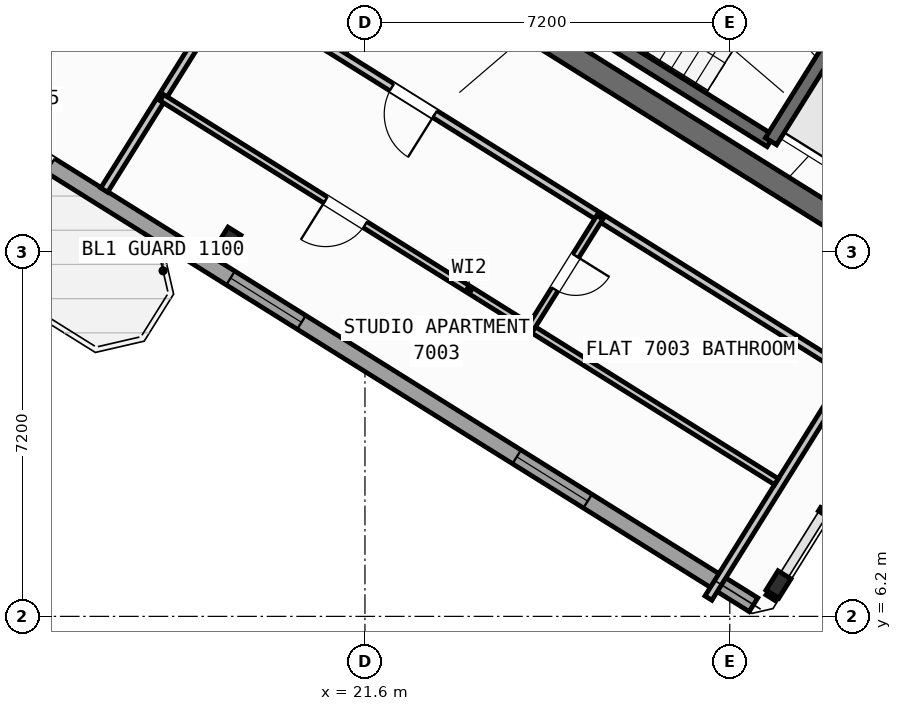
"""IFC4 building model, lengths in metres.
Left out: names, types, materials, properties, quantities, classifications, styles, units other than length and angle.
Written with IfcOpenShell. Run it as: python <this file> out.ifc"""

import sys

from ifc_helpers import new_model, si_unit, direction, frame, frame_2d, origin, origin_2d, place, context, subcontext, project, spatial, rectangle, i_section, extrude, source, transform, mapped, element, fill, save


model = new_model("IFC4")
c1 = context("Model", 3, precision=1e-05, world=origin(), true_north=direction((0.0, 1.0)))
c2 = subcontext(c1, "Body", "Model", "MODEL_VIEW")
j1 = project(units=[si_unit("LENGTHUNIT", "METRE"), si_unit("PLANEANGLEUNIT", "RADIAN")], contexts=[c1])
p1 = place(None, origin())
s1 = spatial("IfcSite", under=j1, at=p1, CompositionType="ELEMENT")
p2 = place(p1, origin())
s2 = spatial("IfcBuilding", under=s1, at=p2, CompositionType="ELEMENT")
p3 = place(p2, frame((0.0, 0.0, 277.2)))
s3 = spatial("IfcBuildingStorey", under=s2, at=p3, CompositionType="ELEMENT", Elevation=277.2)
p4 = place(p3, frame((33.324, 12.503, 0.0), z_axis=(0.0, 0.0, 1.0), x_axis=(-0.848043529849, 0.529926571782, 0.0)))
e1 = element("IfcWall", 1, at=p4, inside=s3, PredefinedType="SHEAR", context=c2, shape_type="SweptSolid", body=[
    extrude(rectangle(XDim=13.04, YDim=0.45, at=frame_2d((6.52, 0.0))), origin(), (0.0, 0.0, 1.0), 3.35),
])
m1 = source(origin(), c2, "Body", "SweptSolid", [
    extrude(i_section(OverallWidth=0.3, OverallDepth=0.45, WebThickness=0.014, FlangeThickness=0.026, at=origin_2d()), origin(), (0.0, 0.0, 1.0), 3.6),
])
for number, where, z_axis, x_axis in (
    (2, (29.761, 6.829, 0.0), (0.0, 0.0, 1.0), (-0.848, 0.53, 0.0)),
    (3, (18.906, 13.612, 0.0), (0.0, 0.0, 1.0), (-0.848, 0.53, 0.0)),
):
    element("IfcColumn", number, at=place(p3, frame(where, z_axis=z_axis, x_axis=x_axis)), inside=s3, PredefinedType="COLUMN", context=c2, shape_type="MappedRepresentation", body=[
        mapped(m1, transform((0.0, 0.0, 0.0), scale=1.0)),
    ])
p5 = place(p3, frame((29.268, 6.429, 0.0), z_axis=(0.0, 0.0, 1.0), x_axis=(-0.848049971435, 0.529916263149, 0.0)))
e4 = element("IfcWall", 4, at=p5, inside=s3, PredefinedType="STANDARD", context=c2, shape_type="SweptSolid", body=[
    extrude(rectangle(XDim=31.588, YDim=0.32, at=frame_2d((15.794, 0.0))), origin(), (0.0, 0.0, 1.0), 3.35),
])
p6 = place(p5, frame((16.362, 0.0, 0.0)))
e5 = element("IfcOpeningElement", 5, at=p6, cuts=e4, PredefinedType="OPENING", context=c2, shape_type="SweptSolid", body=[
    extrude(rectangle(XDim=1.2, YDim=2.15, at=frame_2d((0.6, 1.075))), frame((0.0, 0.17, 0.0), z_axis=(0.0, -1.0, 0.0), x_axis=(1.0, 0.0, 0.0)), (0.0, 0.0, 1.0), 0.34),
])
p7 = place(p5, frame((3.859, 0.0, 0.9)))
e6 = element("IfcOpeningElement", 6, at=p7, cuts=e4, PredefinedType="OPENING", context=c2, shape_type="SweptSolid", body=[
    extrude(rectangle(XDim=1.65, YDim=1.45, at=frame_2d((0.825, 0.725))), frame((0.0, 0.17, 0.0), z_axis=(0.0, -1.0, 0.0), x_axis=(1.0, 0.0, 0.0)), (0.0, 0.0, 1.0), 0.34),
])
p8 = place(p5, frame((10.519, 0.0, 0.9)))
e7 = element("IfcOpeningElement", 7, at=p8, cuts=e4, PredefinedType="OPENING", context=c2, shape_type="SweptSolid", body=[
    extrude(rectangle(XDim=1.65, YDim=1.45, at=frame_2d((0.825, 0.725))), frame((0.0, 0.17, 0.0), z_axis=(0.0, -1.0, 0.0), x_axis=(1.0, 0.0, 0.0)), (0.0, 0.0, 1.0), 0.34),
])
p9 = place(p5, frame((20.015, 0.0, 0.95)))
e8 = element("IfcOpeningElement", 8, at=p9, cuts=e4, PredefinedType="OPENING", context=c2, shape_type="SweptSolid", body=[
    extrude(rectangle(XDim=1.95, YDim=1.35, at=frame_2d((0.975, 0.675))), frame((0.0, 0.17, 0.0), z_axis=(0.0, -1.0, 0.0), x_axis=(1.0, 0.0, 0.0)), (0.0, 0.0, 1.0), 0.34),
])
p10 = place(p5, frame((23.715, 0.0, 1.0)))
e9 = element("IfcOpeningElement", 9, at=p10, cuts=e4, PredefinedType="OPENING", context=c2, shape_type="SweptSolid", body=[
    extrude(rectangle(XDim=0.9, YDim=1.25, at=frame_2d((0.45, 0.625))), frame((0.0, 0.17, 0.0), z_axis=(0.0, -1.0, 0.0), x_axis=(1.0, 0.0, 0.0)), (0.0, 0.0, 1.0), 0.34),
])
p11 = place(p5, frame((27.706, 0.0, 0.9)))
e10 = element("IfcOpeningElement", 10, at=p11, cuts=e4, PredefinedType="OPENING", context=c2, shape_type="SweptSolid", body=[
    extrude(rectangle(XDim=1.65, YDim=1.45, at=frame_2d((0.825, 0.725))), frame((0.0, 0.17, 0.0), z_axis=(0.0, -1.0, 0.0), x_axis=(1.0, 0.0, 0.0)), (0.0, 0.0, 1.0), 0.34),
])
p12 = place(p3, frame((29.605, 15.581, 0.0), z_axis=(0.0, 0.0, 1.0), x_axis=(-0.848036911448, 0.529937163087, 0.0)))
e11 = element("IfcWall", 11, at=p12, inside=s3, PredefinedType="SHEAR", context=c2, shape_type="SweptSolid", body=[
    extrude(rectangle(XDim=7.46, YDim=0.26, at=frame_2d((3.73, 0.0))), origin(), (0.0, 0.0, 1.0), 3.35),
])
p13 = place(p3, frame((31.288, 18.256, 0.0), z_axis=(0.0, 0.0, 1.0), x_axis=(-0.529943379326, -0.848033026897, 0.0)))
e12 = element("IfcWall", 12, at=p13, inside=s3, PredefinedType="SHEAR", context=c2, shape_type="SweptSolid", body=[
    extrude(rectangle(XDim=3.16, YDim=0.26, at=frame_2d((1.58, 0.0))), origin(), (0.0, 0.0, 1.0), 3.35),
])
p14 = place(p3, frame((21.206, 17.292, 0.0), z_axis=(0.0, 0.0, 1.0), x_axis=(-0.848050851465, 0.529914854792, 0.0)))
e13 = element("IfcWall", 13, at=p14, inside=s3, PredefinedType="PARTITIONING", context=c2, shape_type="SweptSolid", body=[
    extrude(rectangle(XDim=2.61, YDim=0.16, at=frame_2d((1.305, 0.0))), origin(), (0.0, 0.0, 1.0), 3.34),
])
p15 = place(p3, frame((24.588, 27.631, 0.0), z_axis=(0.0, 0.0, 1.0), x_axis=(-0.529914586043, -0.848051019396, 0.0)))
e14 = element("IfcWall", 14, at=p15, inside=s3, PredefinedType="PARTITIONING", context=c2, shape_type="SweptSolid", body=[
    extrude(rectangle(XDim=15.35, YDim=0.16, at=frame_2d((7.675, 0.0))), origin(), (0.0, 0.0, 1.0), 3.34),
])
p16 = place(p3, frame((16.572, 21.954, 0.0), z_axis=(0.0, 0.0, 1.0), x_axis=(-0.529904903214, -0.848057069748, 0.0)))
e15 = element("IfcWall", 15, at=p16, inside=s3, PredefinedType="PARTITIONING", context=c2, shape_type="SweptSolid", body=[
    extrude(rectangle(XDim=5.601, YDim=0.16, at=frame_2d((2.801, 0.0))), origin(), (0.0, 0.0, 1.0), 2.875),
])
p17 = place(p3, frame((32.164, 10.374, 0.0), z_axis=(0.0, 0.0, 1.0), x_axis=(-0.848044107957, 0.529925646633, 0.0)))
e16 = element("IfcWall", 16, at=p17, inside=s3, PredefinedType="PARTITIONING", context=c2, shape_type="SweptSolid", body=[
    extrude(rectangle(XDim=15.57, YDim=0.16, at=frame_2d((7.785, 0.0))), origin(), (0.0, 0.0, 1.0), 3.34),
])
p18 = place(p17, frame((10.83, 0.0, 0.0)))
e17 = element("IfcOpeningElement", 17, at=p18, cuts=e16, PredefinedType="OPENING", context=c2, shape_type="SweptSolid", body=[
    extrude(rectangle(XDim=1.0, YDim=2.1, at=frame_2d((0.5, 1.05))), frame((0.0, 0.09, 0.0), z_axis=(0.0, -1.0, 0.0), x_axis=(1.0, 0.0, 0.0)), (0.0, 0.0, 1.0), 0.18),
])
p19 = place(p3, frame((31.282, 11.208, 0.0), z_axis=(0.0, 0.0, 1.0), x_axis=(-0.529938869374, -0.84803584519, 0.0)))
e18 = element("IfcWall", 18, at=p19, inside=s3, PredefinedType="PARTITIONING", context=c2, shape_type="SweptSolid", body=[
    extrude(rectangle(XDim=5.48, YDim=0.16, at=frame_2d((2.74, 0.0))), origin(), (0.0, 0.0, 1.0), 3.34),
])
p20 = place(p3, frame((29.72, 8.859, 0.0), z_axis=(0.0, 0.0, 1.0), x_axis=(-0.848049134363, 0.529917602752, 0.0)))
e19 = element("IfcWall", 19, at=p20, inside=s3, PredefinedType="PLUMBINGWALL", context=c2, shape_type="SweptSolid", body=[
    extrude(rectangle(XDim=14.3, YDim=0.14, at=frame_2d((7.15, 0.0))), origin(), (0.0, 0.0, 1.0), 3.34),
])
p21 = place(p20, frame((9.57, 0.0, 0.0)))
e20 = element("IfcOpeningElement", 20, at=p21, cuts=e19, PredefinedType="OPENING", context=c2, shape_type="SweptSolid", body=[
    extrude(rectangle(XDim=0.92, YDim=2.08, at=frame_2d((0.46, 1.04))), frame((0.0, 0.08, 0.0), z_axis=(0.0, -1.0, 0.0), x_axis=(1.0, 0.0, 0.0)), (0.0, 0.0, 1.0), 0.16),
])
p22 = place(p3, frame((26.237, 14.078, 0.0), z_axis=(0.0, 0.0, 1.0), x_axis=(-0.52995640672, -0.848024885824, 0.0)))
e21 = element("IfcWall", 21, at=p22, inside=s3, PredefinedType="PLUMBINGWALL", context=c2, shape_type="SweptSolid", body=[
    extrude(rectangle(XDim=2.58, YDim=0.14, at=frame_2d((1.29, 0.0))), origin(), (0.0, 0.0, 1.0), 3.34),
])
p23 = place(p22, frame((0.9, 0.0, 0.0)))
e22 = element("IfcOpeningElement", 22, at=p23, cuts=e21, PredefinedType="OPENING", context=c2, shape_type="SweptSolid", body=[
    extrude(rectangle(XDim=0.78, YDim=2.05, at=frame_2d((0.39, 1.025))), frame((0.0, 0.08, 0.0), z_axis=(0.0, -1.0, 0.0), x_axis=(1.0, 0.0, 0.0)), (0.0, 0.0, 1.0), 0.16),
])
m2 = source(origin(), c2, "Body", "SweptSolid", [
    extrude(rectangle(XDim=1.65, YDim=1.45, at=frame_2d((0.825, 0.725))), frame((0.0, 0.03, 0.0), z_axis=(0.0, -1.0, 0.0), x_axis=(1.0, 0.0, 0.0)), (0.0, 0.0, 1.0), 0.06),
])
p24 = place(p7, origin())
e23 = element("IfcWindow", 23, at=p24, inside=s3, PartitioningType="SINGLE_PANEL", PredefinedType="WINDOW", context=c2, shape_type="MappedRepresentation", body=[
    mapped(m2, transform((0.0, 0.0, 0.0), scale=1.0)),
])
fill(e6, e23)
p25 = place(p8, origin())
e24 = element("IfcWindow", 24, at=p25, inside=s3, PartitioningType="SINGLE_PANEL", PredefinedType="WINDOW", context=c2, shape_type="MappedRepresentation", body=[
    mapped(m2, transform((0.0, 0.0, 0.0), scale=1.0)),
])
fill(e7, e24)
m3 = source(origin(), c2, "Body", "SweptSolid", [
    extrude(rectangle(XDim=1.0, YDim=2.1, at=frame_2d((0.5, 1.05))), frame((0.0, 0.025, 0.0), z_axis=(0.0, -1.0, 0.0), x_axis=(1.0, 0.0, 0.0)), (0.0, 0.0, 1.0), 0.05),
])
p26 = place(p18, origin())
e25 = element("IfcDoor", 25, at=p26, inside=s3, OperationType="SINGLE_SWING_LEFT", PredefinedType="DOOR", context=c2, shape_type="MappedRepresentation", body=[
    mapped(m3, transform((0.0, 0.0, 0.0), scale=1.0)),
])
fill(e17, e25)
m4 = source(origin(), c2, "Body", "SweptSolid", [
    extrude(rectangle(XDim=0.92, YDim=2.08, at=frame_2d((0.46, 1.04))), frame((0.0, 0.025, 0.0), z_axis=(0.0, -1.0, 0.0), x_axis=(1.0, 0.0, 0.0)), (0.0, 0.0, 1.0), 0.05),
])
p27 = place(p21, origin())
e26 = element("IfcDoor", 26, at=p27, inside=s3, OperationType="SINGLE_SWING_RIGHT", PredefinedType="DOOR", context=c2, shape_type="MappedRepresentation", body=[
    mapped(m4, transform((0.0, 0.0, 0.0), scale=1.0)),
])
fill(e20, e26)
m5 = source(origin(), c2, "Body", "SweptSolid", [
    extrude(rectangle(XDim=0.78, YDim=2.05, at=frame_2d((0.39, 1.025))), frame((0.0, 0.025, 0.0), z_axis=(0.0, -1.0, 0.0), x_axis=(1.0, 0.0, 0.0)), (0.0, 0.0, 1.0), 0.05),
])
p28 = place(p23, origin())
e27 = element("IfcDoor", 27, at=p28, inside=s3, OperationType="SINGLE_SWING_LEFT", PredefinedType="DOOR", context=c2, shape_type="MappedRepresentation", body=[
    mapped(m5, transform((0.0, 0.0, 0.0), scale=1.0)),
])
fill(e22, e27)
save(model, sys.argv[1])
